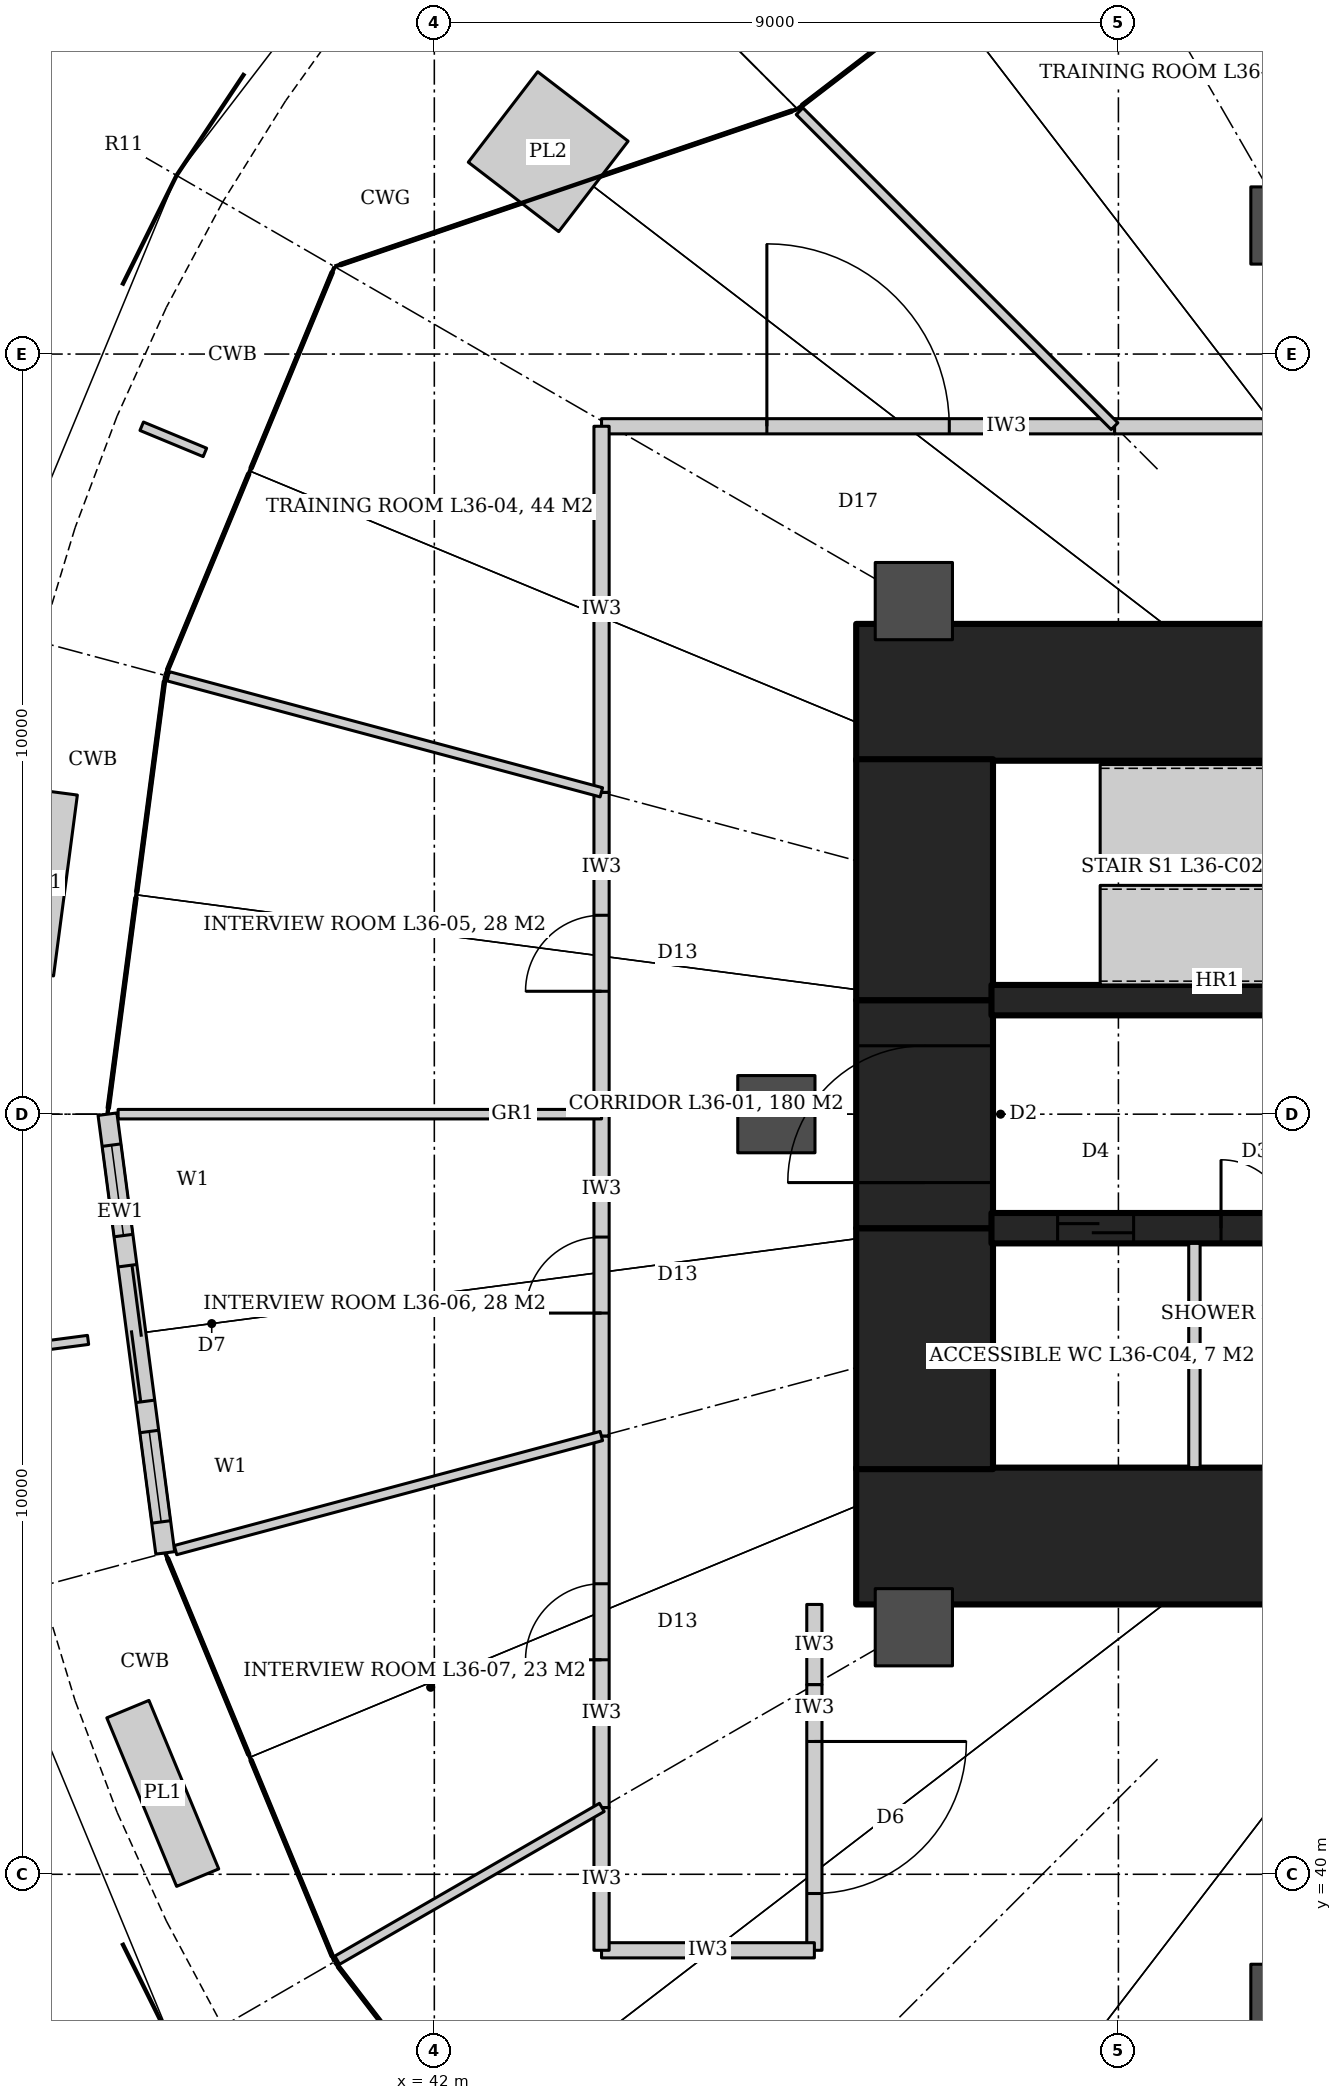
"""IFC4 building model, lengths in metres.
Left out: names, types, materials, properties, quantities, classifications, styles, units other than length and angle.
Written with IfcOpenShell. Run it as: python <this file> out.ifc"""

import sys

from ifc_helpers import new_model, si_unit, direction, frame, frame_2d, origin, origin_2d, place, context, subcontext, project, spatial, rectangle, hollow_circle, extrude, element, fill, save


model = new_model("IFC4")
c1 = context("Model", 3, precision=1e-05, world=origin(), true_north=direction((0.0, 1.0)))
c2 = subcontext(c1, "Body", "Model", "MODEL_VIEW")
j1 = project(units=[si_unit("LENGTHUNIT", "METRE"), si_unit("PLANEANGLEUNIT", "RADIAN")], contexts=[c1])
p1 = place(None, origin())
s1 = spatial("IfcSite", under=j1, at=p1, CompositionType="ELEMENT")
p2 = place(p1, origin())
s2 = spatial("IfcBuilding", under=s1, at=p2, CompositionType="ELEMENT")
p3 = place(p2, frame((0.0, 0.0, 160.4)))
s3 = spatial("IfcBuildingStorey", under=s2, at=p3, CompositionType="ELEMENT", Elevation=160.4)
for number, where, z_axis, x_axis in (
    (1, (47.55, 55.55, 0.0), (0.0, 0.0, 1.0), (1.0, 0.0, 0.0)),
    (2, (47.55, 44.45, 0.0), (0.0, 0.0, 1.0), (1.0, 0.0, 0.0)),
):
    element("IfcWall", number, at=place(p3, frame(where, z_axis=z_axis, x_axis=x_axis)), inside=s3, PredefinedType="SHEAR", context=c2, shape_type="SweptSolid", body=[
        extrude(rectangle(XDim=7.85, YDim=1.8, at=frame_2d((3.925, 0.0))), origin(), (0.0, 0.0, 1.0), 4.2),
    ])
p4 = place(p3, frame((48.45, 45.33, 0.0), z_axis=(0.0, 0.0, 1.0), x_axis=(0.0, 1.0, 0.0)))
e3 = element("IfcWall", 3, at=p4, inside=s3, PredefinedType="SHEAR", context=c2, shape_type="SweptSolid", body=[
    extrude(rectangle(XDim=3.17, YDim=1.8, at=frame_2d((1.585, 0.0))), origin(), (0.0, 0.0, 1.0), 4.2),
])
p5 = place(p3, frame((48.45, 48.5, 0.0), z_axis=(0.0, 0.0, 1.0), x_axis=(0.0, 1.0, 0.0)))
e4 = element("IfcWall", 4, at=p5, inside=s3, PredefinedType="SHEAR", context=c2, shape_type="SweptSolid", body=[
    extrude(rectangle(XDim=3.0, YDim=1.8, at=frame_2d((1.5, 0.0))), origin(), (0.0, 0.0, 1.0), 4.2),
])
p6 = place(p5, frame((0.6, 0.0, 0.0)))
e5 = element("IfcOpeningElement", 5, at=p6, cuts=e4, PredefinedType="OPENING", context=c2, shape_type="SweptSolid", body=[
    extrude(rectangle(XDim=1.8, YDim=2.1, at=frame_2d((0.9, 1.05))), frame((0.0, 0.91, 0.0), z_axis=(0.0, -1.0, 0.0), x_axis=(1.0, 0.0, 0.0)), (0.0, 0.0, 1.0), 1.82),
])
p7 = place(p3, frame((48.45, 51.5, 0.0), z_axis=(0.0, 0.0, 1.0), x_axis=(0.0, 1.0, 0.0)))
e6 = element("IfcWall", 6, at=p7, inside=s3, PredefinedType="SHEAR", context=c2, shape_type="SweptSolid", body=[
    extrude(rectangle(XDim=3.17, YDim=1.8, at=frame_2d((1.585, 0.0))), origin(), (0.0, 0.0, 1.0), 4.2),
])
p8 = place(p3, frame((49.33, 51.5, 0.0), z_axis=(0.0, 0.0, 1.0), x_axis=(1.0, 0.0, 0.0)))
e7 = element("IfcWall", 7, at=p8, inside=s3, PredefinedType="SHEAR", context=c2, shape_type="SweptSolid", body=[
    extrude(rectangle(XDim=6.07, YDim=0.4, at=frame_2d((3.035, 0.0))), origin(), (0.0, 0.0, 1.0), 4.2),
])
p9 = place(p8, frame((4.57, 0.0, 0.0)))
e8 = element("IfcOpeningElement", 8, at=p9, cuts=e7, PredefinedType="OPENING", context=c2, shape_type="SweptSolid", body=[
    extrude(rectangle(XDim=1.0, YDim=2.1, at=frame_2d((0.5, 1.05))), frame((0.0, 0.21, 0.0), z_axis=(0.0, -1.0, 0.0), x_axis=(1.0, 0.0, 0.0)), (0.0, 0.0, 1.0), 0.42),
])
p10 = place(p3, frame((49.33, 48.5, 0.0), z_axis=(0.0, 0.0, 1.0), x_axis=(1.0, 0.0, 0.0)))
e9 = element("IfcWall", 9, at=p10, inside=s3, PredefinedType="SHEAR", context=c2, shape_type="SweptSolid", body=[
    extrude(rectangle(XDim=6.07, YDim=0.4, at=frame_2d((3.035, 0.0))), origin(), (0.0, 0.0, 1.0), 4.2),
])
p11 = place(p10, frame((0.87, 0.0, 0.0)))
e10 = element("IfcOpeningElement", 10, at=p11, cuts=e9, PredefinedType="OPENING", context=c2, shape_type="SweptSolid", body=[
    extrude(rectangle(XDim=1.0, YDim=2.1, at=frame_2d((0.5, 1.05))), frame((0.0, 0.21, 0.0), z_axis=(0.0, -1.0, 0.0), x_axis=(1.0, 0.0, 0.0)), (0.0, 0.0, 1.0), 0.42),
])
p12 = place(p10, frame((3.02, 0.0, 0.0)))
e11 = element("IfcOpeningElement", 11, at=p12, cuts=e9, PredefinedType="OPENING", context=c2, shape_type="SweptSolid", body=[
    extrude(rectangle(XDim=0.9, YDim=2.1, at=frame_2d((0.45, 1.05))), frame((0.0, 0.21, 0.0), z_axis=(0.0, -1.0, 0.0), x_axis=(1.0, 0.0, 0.0)), (0.0, 0.0, 1.0), 0.42),
])
p13 = place(p10, frame((4.62, 0.0, 0.0)))
e12 = element("IfcOpeningElement", 12, at=p13, cuts=e9, PredefinedType="OPENING", context=c2, shape_type="SweptSolid", body=[
    extrude(rectangle(XDim=0.9, YDim=2.1, at=frame_2d((0.45, 1.05))), frame((0.0, 0.21, 0.0), z_axis=(0.0, -1.0, 0.0), x_axis=(1.0, 0.0, 0.0)), (0.0, 0.0, 1.0), 0.42),
])
for number, where, z_axis, x_axis in (
    (13, (53.25, 61.691, 0.0), (0.0, 0.0, 1.0), (1.0, 0.0, 0.0)),
    (14, (48.309, 56.75, 0.0), (0.0, 0.0, 1.0), (1.0, 0.0, 0.0)),
    (15, (46.5, 50.0, 0.0), (0.0, 0.0, 1.0), (1.0, 0.0, 0.0)),
    (16, (48.309, 43.25, 0.0), (0.0, 0.0, 1.0), (1.0, 0.0, 0.0)),
    (17, (53.25, 38.309, 0.0), (0.0, 0.0, 1.0), (1.0, 0.0, 0.0)),
):
    element("IfcColumn", number, at=place(p3, frame(where, z_axis=z_axis, x_axis=x_axis)), inside=s3, PredefinedType="COLUMN", context=c2, shape_type="SweptSolid", body=[
        extrude(hollow_circle(Radius=0.508, WallThickness=0.05, at=origin_2d()), origin(), (0.0, 0.0, 1.0), 4.2),
    ])
p14 = place(p3, frame((44.2, 59.05, 0.0), z_axis=(0.0, 0.0, 1.0), x_axis=(1.0, 0.0, 0.0)))
e18 = element("IfcWall", 18, at=p14, inside=s3, PredefinedType="PARTITIONING", context=c2, shape_type="SweptSolid", body=[
    extrude(rectangle(XDim=6.75, YDim=0.2, at=frame_2d((3.375, 0.0))), origin(), (0.0, 0.0, 1.0), 3.012),
])
p15 = place(p14, frame((2.175, 0.0, 0.0)))
e19 = element("IfcOpeningElement", 19, at=p15, cuts=e18, PredefinedType="OPENING", context=c2, shape_type="SweptSolid", body=[
    extrude(rectangle(XDim=2.4, YDim=2.4, at=frame_2d((1.2, 1.2))), frame((0.0, 0.11, 0.0), z_axis=(0.0, -1.0, 0.0), x_axis=(1.0, 0.0, 0.0)), (0.0, 0.0, 1.0), 0.22),
])
p16 = place(p3, frame((50.95, 59.05, 0.0), z_axis=(0.0, 0.0, 1.0), x_axis=(1.0, 0.0, 0.0)))
e20 = element("IfcWall", 20, at=p16, inside=s3, PredefinedType="PARTITIONING", context=c2, shape_type="SweptSolid", body=[
    extrude(rectangle(XDim=6.625, YDim=0.2, at=frame_2d((3.312, 0.0))), origin(), (0.0, 0.0, 1.0), 3.02),
])
p17 = place(p16, frame((2.113, 0.0, 0.0)))
e21 = element("IfcOpeningElement", 21, at=p17, cuts=e20, PredefinedType="OPENING", context=c2, shape_type="SweptSolid", body=[
    extrude(rectangle(XDim=2.4, YDim=2.4, at=frame_2d((1.2, 1.2))), frame((0.0, 0.11, 0.0), z_axis=(0.0, -1.0, 0.0), x_axis=(1.0, 0.0, 0.0)), (0.0, 0.0, 1.0), 0.22),
])
p18 = place(p3, frame((47.0, 43.55, 0.0), z_axis=(0.0, 0.0, 1.0), x_axis=(0.0, -1.0, 0.0)))
e22 = element("IfcWall", 22, at=p18, inside=s3, PredefinedType="PARTITIONING", context=c2, shape_type="SweptSolid", body=[
    extrude(rectangle(XDim=1.056, YDim=0.2, at=frame_2d((0.528, 0.0))), origin(), (0.0, 0.0, 1.0), 3.012),
])
p19 = place(p3, frame((47.0, 42.494, 0.0), z_axis=(0.0, 0.0, 1.0), x_axis=(0.0, -1.0, 0.0)))
e23 = element("IfcWall", 23, at=p19, inside=s3, PredefinedType="PARTITIONING", context=c2, shape_type="SweptSolid", body=[
    extrude(rectangle(XDim=3.494, YDim=0.2, at=frame_2d((1.747, 0.0))), origin(), (0.0, 0.0, 1.0), 3.012),
])
p20 = place(p19, frame((0.747, 0.0, 0.0)))
e24 = element("IfcOpeningElement", 24, at=p20, cuts=e23, PredefinedType="OPENING", context=c2, shape_type="SweptSolid", body=[
    extrude(rectangle(XDim=2.0, YDim=2.1, at=frame_2d((1.0, 1.05))), frame((0.0, 0.11, 0.0), z_axis=(0.0, -1.0, 0.0), x_axis=(1.0, 0.0, 0.0)), (0.0, 0.0, 1.0), 0.22),
])
p21 = place(p3, frame((47.0, 39.0, 0.0), z_axis=(0.0, 0.0, 1.0), x_axis=(-1.0, 0.0, 0.0)))
e25 = element("IfcWall", 25, at=p21, inside=s3, PredefinedType="PARTITIONING", context=c2, shape_type="SweptSolid", body=[
    extrude(rectangle(XDim=2.8, YDim=0.2, at=frame_2d((1.4, 0.0))), origin(), (0.0, 0.0, 1.0), 3.04),
])
p22 = place(p3, frame((44.2, 39.0, 0.0), z_axis=(0.0, 0.0, 1.0), x_axis=(0.0, 1.0, 0.0)))
e26 = element("IfcWall", 26, at=p22, inside=s3, PredefinedType="PARTITIONING", context=c2, shape_type="SweptSolid", body=[
    extrude(rectangle(XDim=1.878, YDim=0.2, at=frame_2d((0.939, 0.0))), origin(), (0.0, 0.0, 1.0), 3.012),
])
p23 = place(p3, frame((44.2, 40.878, 0.0), z_axis=(0.0, 0.0, 1.0), x_axis=(0.0, 1.0, 0.0)))
e27 = element("IfcWall", 27, at=p23, inside=s3, PredefinedType="PARTITIONING", context=c2, shape_type="SweptSolid", body=[
    extrude(rectangle(XDim=4.888, YDim=0.2, at=frame_2d((2.444, 0.0))), origin(), (0.0, 0.0, 1.0), 3.012),
])
p24 = place(p23, frame((1.944, 0.0, 0.0)))
e28 = element("IfcOpeningElement", 28, at=p24, cuts=e27, PredefinedType="OPENING", context=c2, shape_type="SweptSolid", body=[
    extrude(rectangle(XDim=1.0, YDim=2.4, at=frame_2d((0.5, 1.2))), frame((0.0, 0.11, 0.0), z_axis=(0.0, -1.0, 0.0), x_axis=(1.0, 0.0, 0.0)), (0.0, 0.0, 1.0), 0.22),
])
p25 = place(p3, frame((44.2, 45.766, 0.0), z_axis=(0.0, 0.0, 1.0), x_axis=(0.0, 1.0, 0.0)))
e29 = element("IfcWall", 29, at=p25, inside=s3, PredefinedType="PARTITIONING", context=c2, shape_type="SweptSolid", body=[
    extrude(rectangle(XDim=4.234, YDim=0.2, at=frame_2d((2.117, 0.0))), origin(), (0.0, 0.0, 1.0), 3.012),
])
p26 = place(p25, frame((1.617, 0.0, 0.0)))
e30 = element("IfcOpeningElement", 30, at=p26, cuts=e29, PredefinedType="OPENING", context=c2, shape_type="SweptSolid", body=[
    extrude(rectangle(XDim=1.0, YDim=2.4, at=frame_2d((0.5, 1.2))), frame((0.0, 0.11, 0.0), z_axis=(0.0, -1.0, 0.0), x_axis=(1.0, 0.0, 0.0)), (0.0, 0.0, 1.0), 0.22),
])
p27 = place(p3, frame((44.2, 50.0, 0.0), z_axis=(0.0, 0.0, 1.0), x_axis=(0.0, 1.0, 0.0)))
e31 = element("IfcWall", 31, at=p27, inside=s3, PredefinedType="PARTITIONING", context=c2, shape_type="SweptSolid", body=[
    extrude(rectangle(XDim=4.234, YDim=0.2, at=frame_2d((2.117, 0.0))), origin(), (0.0, 0.0, 1.0), 3.012),
])
p28 = place(p27, frame((1.617, 0.0, 0.0)))
e32 = element("IfcOpeningElement", 32, at=p28, cuts=e31, PredefinedType="OPENING", context=c2, shape_type="SweptSolid", body=[
    extrude(rectangle(XDim=1.0, YDim=2.4, at=frame_2d((0.5, 1.2))), frame((0.0, 0.11, 0.0), z_axis=(0.0, -1.0, 0.0), x_axis=(1.0, 0.0, 0.0)), (0.0, 0.0, 1.0), 0.22),
])
p29 = place(p3, frame((44.2, 54.234, 0.0), z_axis=(0.0, 0.0, 1.0), x_axis=(0.0, 1.0, 0.0)))
e33 = element("IfcWall", 33, at=p29, inside=s3, PredefinedType="PARTITIONING", context=c2, shape_type="SweptSolid", body=[
    extrude(rectangle(XDim=4.816, YDim=0.2, at=frame_2d((2.408, 0.0))), origin(), (0.0, 0.0, 1.0), 3.012),
])
p30 = place(p3, frame((50.949, 59.051, 0.0), z_axis=(0.0, 0.0, 1.0), x_axis=(-0.707106781187, 0.707106781187, 0.0)))
e34 = element("IfcWall", 34, at=p30, inside=s3, PredefinedType="PARTITIONING", context=c2, shape_type="SweptSolid", body=[
    extrude(rectangle(XDim=5.86, YDim=0.125, at=frame_2d((2.93, 0.0))), origin(), (0.0, 0.0, 1.0), 3.012),
])
p31 = place(p3, frame((44.198, 54.234, 0.0), z_axis=(0.0, 0.0, 1.0), x_axis=(-0.965933460469, 0.258790552276, 0.0)))
e35 = element("IfcWall", 35, at=p31, inside=s3, PredefinedType="PARTITIONING", context=c2, shape_type="SweptSolid", body=[
    extrude(rectangle(XDim=5.9, YDim=0.125, at=frame_2d((2.95, 0.0))), origin(), (0.0, 0.0, 1.0), 3.012),
])
p32 = place(p3, frame((44.2, 50.0, 0.0), z_axis=(0.0, 0.0, 1.0), x_axis=(-1.0, 0.0, 0.0)))
e36 = element("IfcWall", 36, at=p32, inside=s3, PredefinedType="PARTITIONING", context=c2, shape_type="SweptSolid", body=[
    extrude(rectangle(XDim=6.36, YDim=0.125, at=frame_2d((3.18, 0.0))), origin(), (0.0, 0.0, 1.0), 3.012),
])
p33 = place(p3, frame((44.198, 45.766, 0.0), z_axis=(0.0, 0.0, 1.0), x_axis=(-0.965932457036, -0.258794297549, 0.0)))
e37 = element("IfcWall", 37, at=p33, inside=s3, PredefinedType="PARTITIONING", context=c2, shape_type="SweptSolid", body=[
    extrude(rectangle(XDim=5.8, YDim=0.125, at=frame_2d((2.9, 0.0))), origin(), (0.0, 0.0, 1.0), 3.012),
])
p34 = place(p3, frame((44.204, 40.88, 0.0), z_axis=(0.0, 0.0, 1.0), x_axis=(-0.866036909293, -0.499980071345, 0.0)))
e38 = element("IfcWall", 38, at=p34, inside=s3, PredefinedType="PARTITIONING", context=c2, shape_type="SweptSolid", body=[
    extrude(rectangle(XDim=4.02, YDim=0.125, at=frame_2d((2.01, 0.0))), origin(), (0.0, 0.0, 1.0), 3.012),
])
p35 = place(p3, frame((37.7, 50.0, 0.0), z_axis=(0.0, 0.0, 1.0), x_axis=(0.130551062135, -0.99144158687, 0.0)))
e39 = element("IfcWall", 39, at=p35, inside=s3, PredefinedType="SOLIDWALL", context=c2, shape_type="SweptSolid", body=[
    extrude(rectangle(XDim=5.822, YDim=0.25, at=frame_2d((2.911, 0.0))), origin(), (0.0, 0.0, 1.0), 4.04),
])
p36 = place(p35, frame((2.011, 0.0, 0.0)))
e40 = element("IfcOpeningElement", 40, at=p36, cuts=e39, PredefinedType="OPENING", context=c2, shape_type="SweptSolid", body=[
    extrude(rectangle(XDim=1.8, YDim=2.4, at=frame_2d((0.9, 1.2))), frame((0.0, 0.135, 0.0), z_axis=(0.0, -1.0, 0.0), x_axis=(1.0, 0.0, 0.0)), (0.0, 0.0, 1.0), 0.27),
])
p37 = place(p35, frame((0.411, 0.0, 0.0)))
e41 = element("IfcOpeningElement", 41, at=p37, cuts=e39, PredefinedType="OPENING", context=c2, shape_type="SweptSolid", body=[
    extrude(rectangle(XDim=1.2, YDim=2.4, at=frame_2d((0.6, 1.2))), frame((0.0, 0.135, 0.0), z_axis=(0.0, -1.0, 0.0), x_axis=(1.0, 0.0, 0.0)), (0.0, 0.0, 1.0), 0.27),
])
p38 = place(p35, frame((4.211, 0.0, 0.0)))
e42 = element("IfcOpeningElement", 42, at=p38, cuts=e39, PredefinedType="OPENING", context=c2, shape_type="SweptSolid", body=[
    extrude(rectangle(XDim=1.2, YDim=2.4, at=frame_2d((0.6, 1.2))), frame((0.0, 0.135, 0.0), z_axis=(0.0, -1.0, 0.0), x_axis=(1.0, 0.0, 0.0)), (0.0, 0.0, 1.0), 0.27),
])
p39 = place(p3, frame((52.0, 45.35, 0.0), z_axis=(0.0, 0.0, 1.0), x_axis=(0.0, 1.0, 0.0)))
e43 = element("IfcWall", 43, at=p39, inside=s3, PredefinedType="PARTITIONING", context=c2, shape_type="SweptSolid", body=[
    extrude(rectangle(XDim=2.95, YDim=0.15, at=frame_2d((1.475, 0.0))), origin(), (0.0, 0.0, 1.0), 4.04),
])
p40 = place(p15, origin())
e44 = element("IfcDoor", 44, at=p40, inside=s3, OperationType="DOUBLE_DOOR_DOUBLE_SWING", PredefinedType="DOOR", context=c2, shape_type="SweptSolid", body=[
    extrude(rectangle(XDim=2.4, YDim=2.4, at=frame_2d((1.2, 1.2))), frame((0.0, 0.025, 0.0), z_axis=(0.0, -1.0, 0.0), x_axis=(1.0, 0.0, 0.0)), (0.0, 0.0, 1.0), 0.05),
])
fill(e19, e44)
p41 = place(p28, origin())
e45 = element("IfcDoor", 45, at=p41, inside=s3, OperationType="SINGLE_SWING_LEFT", PredefinedType="DOOR", context=c2, shape_type="SweptSolid", body=[
    extrude(rectangle(XDim=1.0, YDim=2.4, at=frame_2d((0.5, 1.2))), frame((0.0, 0.025, 0.0), z_axis=(0.0, -1.0, 0.0), x_axis=(1.0, 0.0, 0.0)), (0.0, 0.0, 1.0), 0.05),
])
fill(e32, e45)
p42 = place(p26, origin())
e46 = element("IfcDoor", 46, at=p42, inside=s3, OperationType="SINGLE_SWING_LEFT", PredefinedType="DOOR", context=c2, shape_type="SweptSolid", body=[
    extrude(rectangle(XDim=1.0, YDim=2.4, at=frame_2d((0.5, 1.2))), frame((0.0, 0.025, 0.0), z_axis=(0.0, -1.0, 0.0), x_axis=(1.0, 0.0, 0.0)), (0.0, 0.0, 1.0), 0.05),
])
fill(e30, e46)
p43 = place(p24, origin())
e47 = element("IfcDoor", 47, at=p43, inside=s3, OperationType="SINGLE_SWING_LEFT", PredefinedType="DOOR", context=c2, shape_type="SweptSolid", body=[
    extrude(rectangle(XDim=1.0, YDim=2.4, at=frame_2d((0.5, 1.2))), frame((0.0, 0.025, 0.0), z_axis=(0.0, -1.0, 0.0), x_axis=(1.0, 0.0, 0.0)), (0.0, 0.0, 1.0), 0.05),
])
fill(e28, e47)
p44 = place(p20, origin())
e48 = element("IfcDoor", 48, at=p44, inside=s3, OperationType="DOUBLE_DOOR_DOUBLE_SWING", PredefinedType="DOOR", context=c2, shape_type="SweptSolid", body=[
    extrude(rectangle(XDim=2.0, YDim=2.1, at=frame_2d((1.0, 1.05))), frame((0.0, 0.025, 0.0), z_axis=(0.0, -1.0, 0.0), x_axis=(1.0, 0.0, 0.0)), (0.0, 0.0, 1.0), 0.05),
])
fill(e24, e48)
p45 = place(p36, origin())
e49 = element("IfcDoor", 49, at=p45, inside=s3, OperationType="DOUBLE_DOOR_SLIDING", PredefinedType="DOOR", context=c2, shape_type="SweptSolid", body=[
    extrude(rectangle(XDim=1.8, YDim=2.4, at=frame_2d((0.9, 1.2))), frame((0.0, 0.025, 0.0), z_axis=(0.0, -1.0, 0.0), x_axis=(1.0, 0.0, 0.0)), (0.0, 0.0, 1.0), 0.05),
])
fill(e40, e49)
p46 = place(p37, origin())
e50 = element("IfcWindow", 50, at=p46, inside=s3, PartitioningType="SINGLE_PANEL", PredefinedType="WINDOW", context=c2, shape_type="SweptSolid", body=[
    extrude(rectangle(XDim=1.2, YDim=2.4, at=frame_2d((0.6, 1.2))), frame((0.0, 0.03, 0.0), z_axis=(0.0, -1.0, 0.0), x_axis=(1.0, 0.0, 0.0)), (0.0, 0.0, 1.0), 0.06),
])
fill(e41, e50)
p47 = place(p38, origin())
e51 = element("IfcWindow", 51, at=p47, inside=s3, PartitioningType="SINGLE_PANEL", PredefinedType="WINDOW", context=c2, shape_type="SweptSolid", body=[
    extrude(rectangle(XDim=1.2, YDim=2.4, at=frame_2d((0.6, 1.2))), frame((0.0, 0.03, 0.0), z_axis=(0.0, -1.0, 0.0), x_axis=(1.0, 0.0, 0.0)), (0.0, 0.0, 1.0), 0.06),
])
fill(e42, e51)
p48 = place(p11, origin())
e52 = element("IfcDoor", 52, at=p48, inside=s3, OperationType="SLIDING_TO_LEFT", PredefinedType="DOOR", context=c2, shape_type="SweptSolid", body=[
    extrude(rectangle(XDim=1.0, YDim=2.1, at=frame_2d((0.5, 1.05))), frame((0.0, 0.025, 0.0), z_axis=(0.0, -1.0, 0.0), x_axis=(1.0, 0.0, 0.0)), (0.0, 0.0, 1.0), 0.05),
])
fill(e10, e52)
p49 = place(p12, origin())
e53 = element("IfcDoor", 53, at=p49, inside=s3, OperationType="SINGLE_SWING_RIGHT", PredefinedType="DOOR", context=c2, shape_type="SweptSolid", body=[
    extrude(rectangle(XDim=0.9, YDim=2.1, at=frame_2d((0.45, 1.05))), frame((0.0, 0.025, 0.0), z_axis=(0.0, -1.0, 0.0), x_axis=(1.0, 0.0, 0.0)), (0.0, 0.0, 1.0), 0.05),
])
fill(e11, e53)
p50 = place(p6, origin())
e54 = element("IfcDoor", 54, at=p50, inside=s3, OperationType="DOUBLE_DOOR_DOUBLE_SWING", PredefinedType="DOOR", context=c2, shape_type="SweptSolid", body=[
    extrude(rectangle(XDim=1.8, YDim=2.1, at=frame_2d((0.9, 1.05))), frame((0.0, 0.025, 0.0), z_axis=(0.0, -1.0, 0.0), x_axis=(1.0, 0.0, 0.0)), (0.0, 0.0, 1.0), 0.05),
])
fill(e5, e54)
save(model, sys.argv[1])
